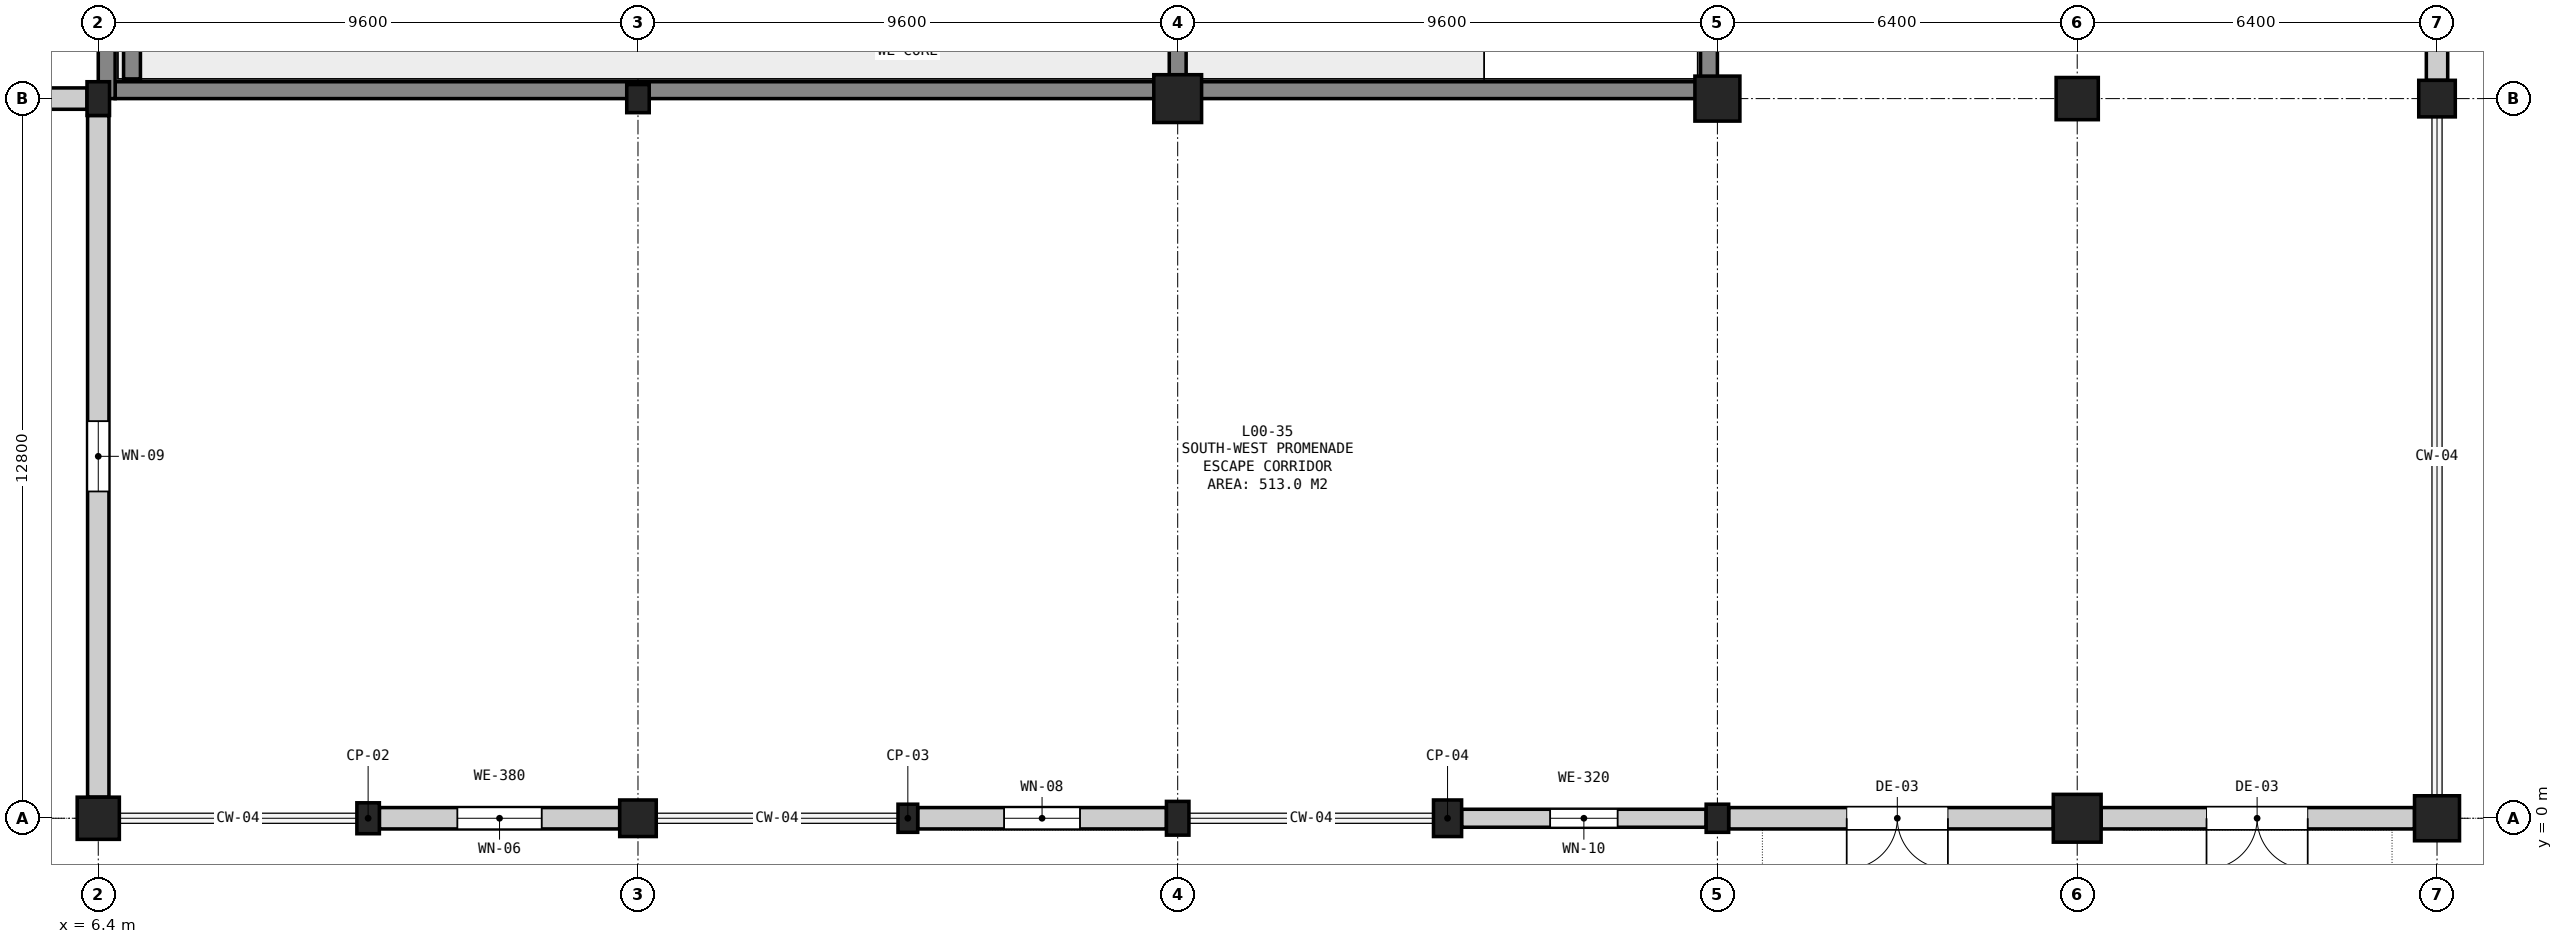
"""IFC4 building model, lengths in metres.
Left out: names, types, materials, properties, quantities, classifications, styles, units other than length and angle.
Written with IfcOpenShell. Run it as: python <this file> out.ifc"""

import sys

from ifc_helpers import new_model, si_unit, direction, frame, frame_2d, origin, origin_2d, place, context, subcontext, project, spatial, rectangle, extrude, element, fill, save


model = new_model("IFC4")
c1 = context("Model", 3, precision=1e-05, world=origin(), true_north=direction((0.0, 1.0)))
c2 = subcontext(c1, "Body", "Model", "MODEL_VIEW")
j1 = project(units=[si_unit("LENGTHUNIT", "METRE"), si_unit("PLANEANGLEUNIT", "RADIAN")], contexts=[c1])
p1 = place(None, origin())
s1 = spatial("IfcSite", under=j1, at=p1, CompositionType="ELEMENT")
p2 = place(p1, origin())
s2 = spatial("IfcBuilding", under=s1, at=p2, CompositionType="ELEMENT")
p3 = place(p2, origin())
s3 = spatial("IfcBuildingStorey", under=s2, at=p3, CompositionType="ELEMENT", Elevation=0.0)
p4 = place(p3, frame((6.4, 0.0, 0.0), z_axis=(0.0, 0.0, 1.0), x_axis=(1.0, 0.0, 0.0)))
e1 = element("IfcColumn", 1, at=p4, inside=s3, PredefinedType="COLUMN", context=c2, shape_type="SweptSolid", body=[
    extrude(rectangle(XDim=0.75, YDim=0.75, at=origin_2d()), origin(), (0.0, 0.0, 1.0), 5.4),
])
p5 = place(p3, frame((6.4, 12.8, 0.0), z_axis=(0.0, 0.0, 1.0), x_axis=(1.0, 0.0, 0.0)))
e2 = element("IfcColumn", 2, at=p5, inside=s3, PredefinedType="COLUMN", context=c2, shape_type="SweptSolid", body=[
    extrude(rectangle(XDim=0.4, YDim=0.6, at=origin_2d()), origin(), (0.0, 0.0, 1.0), 5.4),
])
p6 = place(p3, frame((16.0, 0.0, 0.0), z_axis=(0.0, 0.0, 1.0), x_axis=(1.0, 0.0, 0.0)))
e3 = element("IfcColumn", 3, at=p6, inside=s3, PredefinedType="COLUMN", context=c2, shape_type="SweptSolid", body=[
    extrude(rectangle(XDim=0.65, YDim=0.65, at=origin_2d()), origin(), (0.0, 0.0, 1.0), 5.4),
])
p7 = place(p3, frame((16.0, 12.8, 0.0), z_axis=(0.0, 0.0, 1.0), x_axis=(1.0, 0.0, 0.0)))
e4 = element("IfcColumn", 4, at=p7, inside=s3, PredefinedType="COLUMN", context=c2, shape_type="SweptSolid", body=[
    extrude(rectangle(XDim=0.4, YDim=0.5, at=origin_2d()), origin(), (0.0, 0.0, 1.0), 5.4),
])
p8 = place(p3, frame((25.6, 0.0, 0.0), z_axis=(0.0, 0.0, 1.0), x_axis=(1.0, 0.0, 0.0)))
e5 = element("IfcColumn", 5, at=p8, inside=s3, PredefinedType="COLUMN", context=c2, shape_type="SweptSolid", body=[
    extrude(rectangle(XDim=0.4, YDim=0.6, at=origin_2d()), origin(), (0.0, 0.0, 1.0), 5.4),
])
p9 = place(p3, frame((25.6, 12.8, 0.0), z_axis=(0.0, 0.0, 1.0), x_axis=(1.0, 0.0, 0.0)))
e6 = element("IfcColumn", 6, at=p9, inside=s3, PredefinedType="COLUMN", context=c2, shape_type="SweptSolid", body=[
    extrude(rectangle(XDim=0.85, YDim=0.85, at=origin_2d()), origin(), (0.0, 0.0, 1.0), 5.4),
])
p10 = place(p3, frame((35.2, 0.0, 0.0), z_axis=(0.0, 0.0, 1.0), x_axis=(1.0, 0.0, 0.0)))
e7 = element("IfcColumn", 7, at=p10, inside=s3, PredefinedType="COLUMN", context=c2, shape_type="SweptSolid", body=[
    extrude(rectangle(XDim=0.4, YDim=0.5, at=origin_2d()), origin(), (0.0, 0.0, 1.0), 5.4),
])
p11 = place(p3, frame((35.2, 12.8, 0.0), z_axis=(0.0, 0.0, 1.0), x_axis=(1.0, 0.0, 0.0)))
e8 = element("IfcColumn", 8, at=p11, inside=s3, PredefinedType="COLUMN", context=c2, shape_type="SweptSolid", body=[
    extrude(rectangle(XDim=0.8, YDim=0.8, at=origin_2d()), origin(), (0.0, 0.0, 1.0), 5.4),
])
p12 = place(p3, frame((41.6, 0.0, 0.0), z_axis=(0.0, 0.0, 1.0), x_axis=(1.0, 0.0, 0.0)))
e9 = element("IfcColumn", 9, at=p12, inside=s3, PredefinedType="COLUMN", context=c2, shape_type="SweptSolid", body=[
    extrude(rectangle(XDim=0.85, YDim=0.85, at=origin_2d()), origin(), (0.0, 0.0, 1.0), 5.4),
])
p13 = place(p3, frame((41.6, 12.8, 0.0), z_axis=(0.0, 0.0, 1.0), x_axis=(1.0, 0.0, 0.0)))
e10 = element("IfcColumn", 10, at=p13, inside=s3, PredefinedType="COLUMN", context=c2, shape_type="SweptSolid", body=[
    extrude(rectangle(XDim=0.75, YDim=0.75, at=origin_2d()), origin(), (0.0, 0.0, 1.0), 5.4),
])
p14 = place(p3, frame((48.0, 0.0, 0.0), z_axis=(0.0, 0.0, 1.0), x_axis=(1.0, 0.0, 0.0)))
e11 = element("IfcColumn", 11, at=p14, inside=s3, PredefinedType="COLUMN", context=c2, shape_type="SweptSolid", body=[
    extrude(rectangle(XDim=0.8, YDim=0.8, at=origin_2d()), origin(), (0.0, 0.0, 1.0), 5.4),
])
p15 = place(p3, frame((48.0, 12.8, 0.0), z_axis=(0.0, 0.0, 1.0), x_axis=(1.0, 0.0, 0.0)))
e12 = element("IfcColumn", 12, at=p15, inside=s3, PredefinedType="COLUMN", context=c2, shape_type="SweptSolid", body=[
    extrude(rectangle(XDim=0.65, YDim=0.65, at=origin_2d()), origin(), (0.0, 0.0, 1.0), 5.4),
])
p16 = place(p3, frame((11.2, 0.0, 0.0), z_axis=(0.0, 0.0, 1.0), x_axis=(1.0, 0.0, 0.0)))
e13 = element("IfcColumn", 13, at=p16, inside=s3, PredefinedType="PILASTER", context=c2, shape_type="SweptSolid", body=[
    extrude(rectangle(XDim=0.4, YDim=0.55, at=origin_2d()), origin(), (0.0, 0.0, 1.0), 5.4),
])
p17 = place(p3, frame((20.8, 0.0, 0.0), z_axis=(0.0, 0.0, 1.0), x_axis=(1.0, 0.0, 0.0)))
e14 = element("IfcColumn", 14, at=p17, inside=s3, PredefinedType="PILASTER", context=c2, shape_type="SweptSolid", body=[
    extrude(rectangle(XDim=0.35, YDim=0.5, at=origin_2d()), origin(), (0.0, 0.0, 1.0), 5.4),
])
p18 = place(p3, frame((30.4, 0.0, 0.0), z_axis=(0.0, 0.0, 1.0), x_axis=(1.0, 0.0, 0.0)))
e15 = element("IfcColumn", 15, at=p18, inside=s3, PredefinedType="PILASTER", context=c2, shape_type="SweptSolid", body=[
    extrude(rectangle(XDim=0.5, YDim=0.65, at=origin_2d()), origin(), (0.0, 0.0, 1.0), 5.4),
])
p19 = place(p3, frame((25.6, 13.15, 0.0), z_axis=(0.0, 0.0, 1.0), x_axis=(0.0, 1.0, 0.0)))
e16 = element("IfcWall", 16, at=p19, inside=s3, PredefinedType="SHEAR", context=c2, shape_type="SweptSolid", body=[
    extrude(rectangle(XDim=22.5, YDim=0.3, at=frame_2d((11.25, 0.0))), origin(), (0.0, 0.0, 1.0), 0.784),
])
p20 = place(p3, frame((7.0, 13.15, 0.0), z_axis=(0.0, 0.0, 1.0), x_axis=(0.0, 1.0, 0.0)))
e17 = element("IfcWall", 17, at=p20, inside=s3, PredefinedType="SHEAR", context=c2, shape_type="SweptSolid", body=[
    extrude(rectangle(XDim=22.5, YDim=0.3, at=frame_2d((11.25, 0.0))), origin(), (0.0, 0.0, 1.0), 3.597),
])
p21 = place(p3, frame((11.4, 0.0, 0.0), z_axis=(0.0, 0.0, 1.0), x_axis=(1.0, 0.0, 0.0)))
e18 = element("IfcWall", 18, at=p21, inside=s3, PredefinedType="SOLIDWALL", context=c2, shape_type="SweptSolid", body=[
    extrude(rectangle(XDim=4.275, YDim=0.38, at=frame_2d((2.138, 0.0))), origin(), (0.0, 0.0, 1.0), 4.48),
])
p22 = place(p21, frame((1.387, 0.0, 0.9)))
e19 = element("IfcOpeningElement", 19, at=p22, cuts=e18, PredefinedType="OPENING", context=c2, shape_type="SweptSolid", body=[
    extrude(rectangle(XDim=1.5, YDim=1.85, at=frame_2d((0.75, 0.925))), frame((0.0, 0.202, 0.0), z_axis=(0.0, -1.0, 0.0), x_axis=(1.0, 0.0, 0.0)), (0.0, 0.0, 1.0), 0.404),
])
p23 = place(p3, frame((20.975, 0.0, 0.0), z_axis=(0.0, 0.0, 1.0), x_axis=(1.0, 0.0, 0.0)))
e20 = element("IfcWall", 20, at=p23, inside=s3, PredefinedType="SOLIDWALL", context=c2, shape_type="SweptSolid", body=[
    extrude(rectangle(XDim=4.425, YDim=0.38, at=frame_2d((2.212, 0.0))), origin(), (0.0, 0.0, 1.0), 4.48),
])
p24 = place(p23, frame((1.538, 0.0, 0.9)))
e21 = element("IfcOpeningElement", 21, at=p24, cuts=e20, PredefinedType="OPENING", context=c2, shape_type="SweptSolid", body=[
    extrude(rectangle(XDim=1.35, YDim=1.75, at=frame_2d((0.675, 0.875))), frame((0.0, 0.202, 0.0), z_axis=(0.0, -1.0, 0.0), x_axis=(1.0, 0.0, 0.0)), (0.0, 0.0, 1.0), 0.404),
])
p25 = place(p3, frame((30.65, 0.0, 0.0), z_axis=(0.0, 0.0, 1.0), x_axis=(1.0, 0.0, 0.0)))
e22 = element("IfcWall", 22, at=p25, inside=s3, PredefinedType="SOLIDWALL", context=c2, shape_type="SweptSolid", body=[
    extrude(rectangle(XDim=4.35, YDim=0.32, at=frame_2d((2.175, 0.0))), origin(), (0.0, 0.0, 1.0), 4.48),
])
p26 = place(p25, frame((1.575, 0.0, 0.9)))
e23 = element("IfcOpeningElement", 23, at=p26, cuts=e22, PredefinedType="OPENING", context=c2, shape_type="SweptSolid", body=[
    extrude(rectangle(XDim=1.2, YDim=1.7, at=frame_2d((0.6, 0.85))), frame((0.0, 0.172, 0.0), z_axis=(0.0, -1.0, 0.0), x_axis=(1.0, 0.0, 0.0)), (0.0, 0.0, 1.0), 0.344),
])
p27 = place(p3, frame((35.4, 0.0, 0.0), z_axis=(0.0, 0.0, 1.0), x_axis=(1.0, 0.0, 0.0)))
e24 = element("IfcWall", 24, at=p27, inside=s3, PredefinedType="SOLIDWALL", context=c2, shape_type="SweptSolid", body=[
    extrude(rectangle(XDim=5.775, YDim=0.38, at=frame_2d((2.888, 0.0))), origin(), (0.0, 0.0, 1.0), 4.48),
])
p28 = place(p27, frame((2.1, 0.0, 0.0)))
e25 = element("IfcOpeningElement", 25, at=p28, cuts=e24, PredefinedType="OPENING", context=c2, shape_type="SweptSolid", body=[
    extrude(rectangle(XDim=1.8, YDim=2.25, at=frame_2d((0.9, 1.125))), frame((0.0, 0.202, 0.0), z_axis=(0.0, -1.0, 0.0), x_axis=(1.0, 0.0, 0.0)), (0.0, 0.0, 1.0), 0.404),
])
p29 = place(p3, frame((42.025, 0.0, 0.0), z_axis=(0.0, 0.0, 1.0), x_axis=(1.0, 0.0, 0.0)))
e26 = element("IfcWall", 26, at=p29, inside=s3, PredefinedType="SOLIDWALL", context=c2, shape_type="SweptSolid", body=[
    extrude(rectangle(XDim=5.575, YDim=0.38, at=frame_2d((2.788, 0.0))), origin(), (0.0, 0.0, 1.0), 4.465),
])
p30 = place(p29, frame((1.875, 0.0, 0.0)))
e27 = element("IfcOpeningElement", 27, at=p30, cuts=e26, PredefinedType="OPENING", context=c2, shape_type="SweptSolid", body=[
    extrude(rectangle(XDim=1.8, YDim=2.25, at=frame_2d((0.9, 1.125))), frame((0.0, 0.202, 0.0), z_axis=(0.0, -1.0, 0.0), x_axis=(1.0, 0.0, 0.0)), (0.0, 0.0, 1.0), 0.404),
])
p31 = place(p3, frame((48.0, 13.125, 0.0), z_axis=(0.0, 0.0, 1.0), x_axis=(0.0, 1.0, 0.0)))
e28 = element("IfcWall", 28, at=p31, inside=s3, PredefinedType="SOLIDWALL", context=c2, shape_type="SweptSolid", body=[
    extrude(rectangle(XDim=14.625, YDim=0.38, at=frame_2d((7.312, 0.0))), origin(), (0.0, 0.0, 1.0), 4.065),
])
p32 = place(p31, frame((11.975, 0.0, 0.0)))
e29 = element("IfcOpeningElement", 29, at=p32, cuts=e28, PredefinedType="OPENING", context=c2, shape_type="SweptSolid", body=[
    extrude(rectangle(XDim=1.8, YDim=2.25, at=frame_2d((0.9, 1.125))), frame((0.0, 0.202, 0.0), z_axis=(0.0, -1.0, 0.0), x_axis=(1.0, 0.0, 0.0)), (0.0, 0.0, 1.0), 0.404),
])
p33 = place(p3, frame((0.325, 12.8, 0.0), z_axis=(0.0, 0.0, 1.0), x_axis=(1.0, 0.0, 0.0)))
e30 = element("IfcWall", 30, at=p33, inside=s3, PredefinedType="SOLIDWALL", context=c2, shape_type="SweptSolid", body=[
    extrude(rectangle(XDim=5.875, YDim=0.38, at=frame_2d((2.938, 0.0))), origin(), (0.0, 0.0, 1.0), 4.48),
])
p34 = place(p33, frame((2.262, 0.0, 0.9)))
e31 = element("IfcOpeningElement", 31, at=p34, cuts=e30, PredefinedType="OPENING", context=c2, shape_type="SweptSolid", body=[
    extrude(rectangle(XDim=1.35, YDim=1.75, at=frame_2d((0.675, 0.875))), frame((0.0, 0.202, 0.0), z_axis=(0.0, -1.0, 0.0), x_axis=(1.0, 0.0, 0.0)), (0.0, 0.0, 1.0), 0.404),
])
p35 = place(p3, frame((6.4, 12.5, 0.0), z_axis=(0.0, 0.0, 1.0), x_axis=(0.0, -1.0, 0.0)))
e32 = element("IfcWall", 32, at=p35, inside=s3, PredefinedType="SOLIDWALL", context=c2, shape_type="SweptSolid", body=[
    extrude(rectangle(XDim=12.125, YDim=0.38, at=frame_2d((6.062, 0.0))), origin(), (0.0, 0.0, 1.0), 4.065),
])
p36 = place(p35, frame((5.438, 0.0, 0.9)))
e33 = element("IfcOpeningElement", 33, at=p36, cuts=e32, PredefinedType="OPENING", context=c2, shape_type="SweptSolid", body=[
    extrude(rectangle(XDim=1.25, YDim=1.9, at=frame_2d((0.625, 0.95))), frame((0.0, 0.202, 0.0), z_axis=(0.0, -1.0, 0.0), x_axis=(1.0, 0.0, 0.0)), (0.0, 0.0, 1.0), 0.404),
])
p37 = place(p3, frame((6.7, 12.95, 0.0), z_axis=(0.0, 0.0, 1.0), x_axis=(1.0, 0.0, 0.0)))
e34 = element("IfcWall", 34, at=p37, inside=s3, PredefinedType="SHEAR", context=c2, shape_type="SweptSolid", body=[
    extrude(rectangle(XDim=28.2, YDim=0.3, at=frame_2d((14.1, 0.0))), origin(), (0.0, 0.0, 1.0), 5.08),
])
p38 = place(p3, frame((6.55, 12.8, 0.0), z_axis=(0.0, 0.0, 1.0), x_axis=(0.0, 1.0, 0.0)))
e35 = element("IfcWall", 35, at=p38, inside=s3, PredefinedType="SHEAR", context=c2, shape_type="SweptSolid", body=[
    extrude(rectangle(XDim=23.2, YDim=0.3, at=frame_2d((11.6, 0.0))), origin(), (0.0, 0.0, 1.0), 5.08),
])
p39 = place(p3, frame((35.05, 12.8, 0.0), z_axis=(0.0, 0.0, 1.0), x_axis=(0.0, 1.0, 0.0)))
e36 = element("IfcWall", 36, at=p39, inside=s3, PredefinedType="SHEAR", context=c2, shape_type="SweptSolid", body=[
    extrude(rectangle(XDim=23.2, YDim=0.3, at=frame_2d((11.6, 0.0))), origin(), (0.0, 0.0, 1.0), 5.08),
])
p40 = place(p39, frame((6.7, 0.0, 0.0)))
e37 = element("IfcOpeningElement", 37, at=p40, cuts=e36, PredefinedType="OPENING", context=c2, shape_type="SweptSolid", body=[
    extrude(rectangle(XDim=1.8, YDim=2.3, at=frame_2d((0.9, 1.15))), frame((0.0, 0.162, 0.0), z_axis=(0.0, -1.0, 0.0), x_axis=(1.0, 0.0, 0.0)), (0.0, 0.0, 1.0), 0.324),
])
p41 = place(p22, origin())
e38 = element("IfcWindow", 38, at=p41, inside=s3, PartitioningType="SINGLE_PANEL", PredefinedType="WINDOW", context=c2, shape_type="SweptSolid", body=[
    extrude(rectangle(XDim=1.5, YDim=1.85, at=frame_2d((0.75, 0.925))), frame((0.0, 0.03, 0.0), z_axis=(0.0, -1.0, 0.0), x_axis=(1.0, 0.0, 0.0)), (0.0, 0.0, 1.0), 0.06),
])
fill(e19, e38)
p42 = place(p24, origin())
e39 = element("IfcWindow", 39, at=p42, inside=s3, PartitioningType="SINGLE_PANEL", PredefinedType="WINDOW", context=c2, shape_type="SweptSolid", body=[
    extrude(rectangle(XDim=1.35, YDim=1.75, at=frame_2d((0.675, 0.875))), frame((0.0, 0.03, 0.0), z_axis=(0.0, -1.0, 0.0), x_axis=(1.0, 0.0, 0.0)), (0.0, 0.0, 1.0), 0.06),
])
fill(e21, e39)
p43 = place(p26, origin())
e40 = element("IfcWindow", 40, at=p43, inside=s3, PartitioningType="SINGLE_PANEL", PredefinedType="WINDOW", context=c2, shape_type="SweptSolid", body=[
    extrude(rectangle(XDim=1.2, YDim=1.7, at=frame_2d((0.6, 0.85))), frame((0.0, 0.03, 0.0), z_axis=(0.0, -1.0, 0.0), x_axis=(1.0, 0.0, 0.0)), (0.0, 0.0, 1.0), 0.06),
])
fill(e23, e40)
p44 = place(p28, frame((1.8, 0.0, 0.0), z_axis=(0.0, 0.0, 1.0), x_axis=(-1.0, 0.0, 0.0)))
e41 = element("IfcDoor", 41, at=p44, inside=s3, OperationType="DOUBLE_DOOR_SINGLE_SWING", PredefinedType="DOOR", context=c2, shape_type="SweptSolid", body=[
    extrude(rectangle(XDim=1.8, YDim=2.25, at=frame_2d((0.9, 1.125))), frame((0.0, 0.025, 0.0), z_axis=(0.0, -1.0, 0.0), x_axis=(1.0, 0.0, 0.0)), (0.0, 0.0, 1.0), 0.05),
])
fill(e25, e41)
p45 = place(p30, frame((1.8, 0.0, 0.0), z_axis=(0.0, 0.0, 1.0), x_axis=(-1.0, 0.0, 0.0)))
e42 = element("IfcDoor", 42, at=p45, inside=s3, OperationType="DOUBLE_DOOR_SINGLE_SWING", PredefinedType="DOOR", context=c2, shape_type="SweptSolid", body=[
    extrude(rectangle(XDim=1.8, YDim=2.25, at=frame_2d((0.9, 1.125))), frame((0.0, 0.025, 0.0), z_axis=(0.0, -1.0, 0.0), x_axis=(1.0, 0.0, 0.0)), (0.0, 0.0, 1.0), 0.05),
])
fill(e27, e42)
p46 = place(p36, origin())
e43 = element("IfcWindow", 43, at=p46, inside=s3, PartitioningType="SINGLE_PANEL", PredefinedType="WINDOW", context=c2, shape_type="SweptSolid", body=[
    extrude(rectangle(XDim=1.25, YDim=1.9, at=frame_2d((0.625, 0.95))), frame((0.0, 0.03, 0.0), z_axis=(0.0, -1.0, 0.0), x_axis=(1.0, 0.0, 0.0)), (0.0, 0.0, 1.0), 0.06),
])
fill(e33, e43)
save(model, sys.argv[1])
